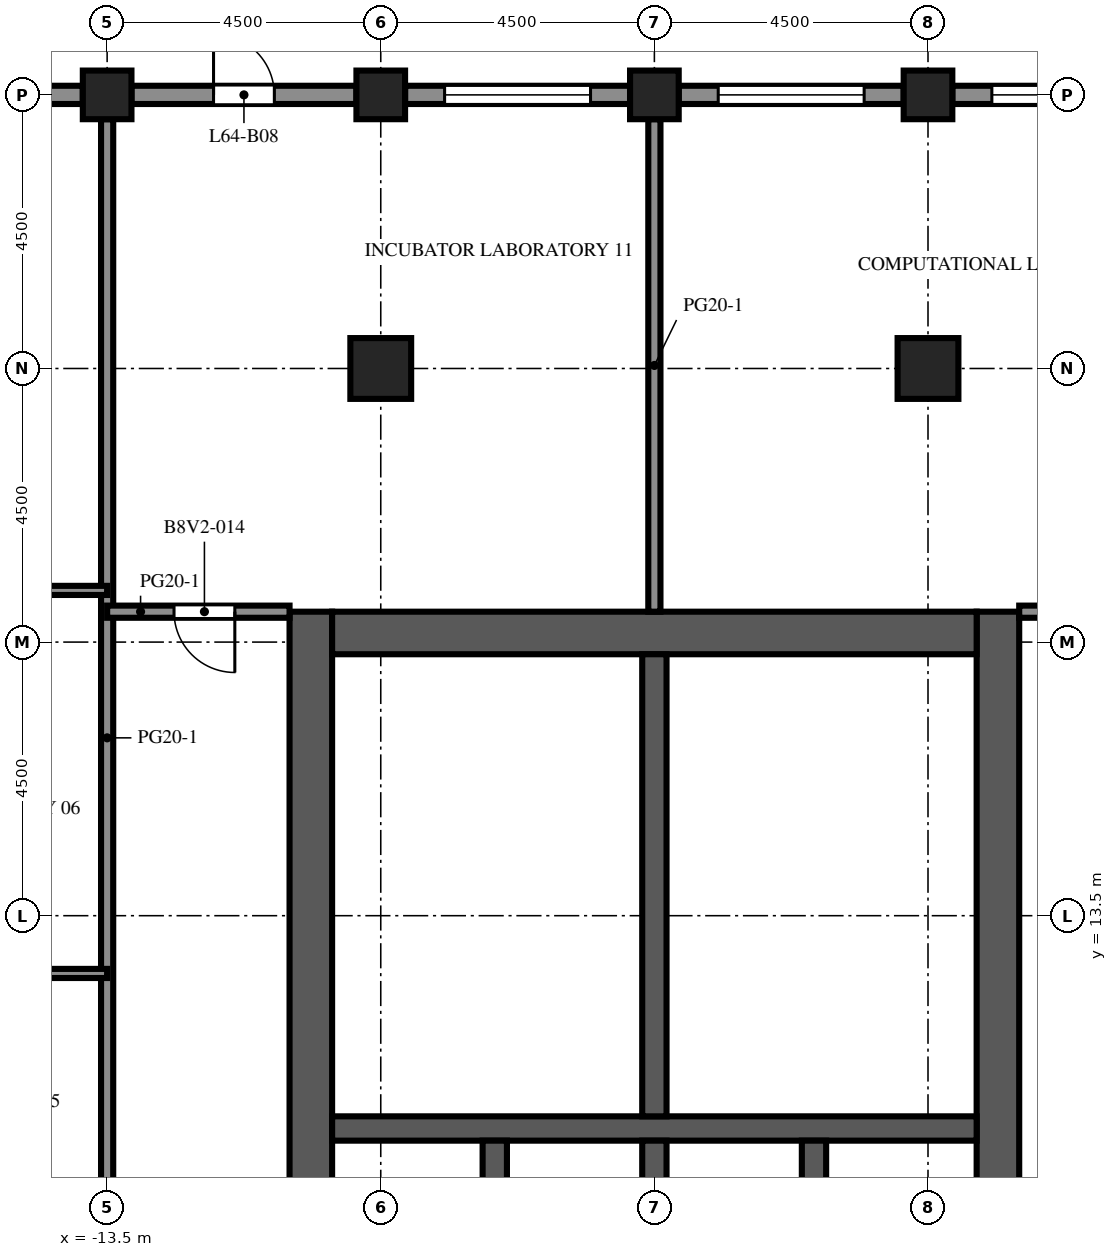
"""IFC4 building model, lengths in metres.
Left out: names, types, materials, properties, quantities, classifications, styles, units other than length and angle.
Written with IfcOpenShell. Run it as: python <this file> out.ifc"""

import sys

from ifc_helpers import new_model, si_unit, direction, frame, frame_2d, origin, origin_2d, place, context, subcontext, project, spatial, rectangle, extrude, element, fill, save


model = new_model("IFC4")
c1 = context("Model", 3, precision=1e-05, world=origin(), true_north=direction((0.0, 1.0)))
c2 = subcontext(c1, "Body", "Model", "MODEL_VIEW")
j1 = project(units=[si_unit("LENGTHUNIT", "METRE"), si_unit("PLANEANGLEUNIT", "RADIAN")], contexts=[c1])
p1 = place(None, origin())
s1 = spatial("IfcSite", under=j1, at=p1, CompositionType="ELEMENT")
p2 = place(p1, origin())
s2 = spatial("IfcBuilding", under=s1, at=p2, CompositionType="ELEMENT")
p3 = place(p2, frame((0.0, 0.0, 282.7)))
s3 = spatial("IfcBuildingStorey", under=s2, at=p3, CompositionType="ELEMENT", Elevation=282.7)
for number, where, z_axis, x_axis in (
    (1, (-13.5, 27.0, 0.0), (0.0, 0.0, 1.0), (1.0, 0.0, 0.0)),
    (2, (-9.0, 27.0, 0.0), (0.0, 0.0, 1.0), (1.0, 0.0, 0.0)),
    (3, (-4.5, 27.0, 0.0), (0.0, 0.0, 1.0), (1.0, 0.0, 0.0)),
    (4, (0.0, 27.0, 0.0), (0.0, 0.0, 1.0), (1.0, 0.0, 0.0)),
):
    element("IfcColumn", number, at=place(p3, frame(where, z_axis=z_axis, x_axis=x_axis)), inside=s3, PredefinedType="COLUMN", context=c2, shape_type="SweptSolid", body=[
        extrude(rectangle(XDim=0.8, YDim=0.8, at=origin_2d()), origin(), (0.0, 0.0, 1.0), 4.1),
    ])
for number, where, z_axis, x_axis in (
    (5, (-9.0, 22.5, 0.0), (0.0, 0.0, 1.0), (1.0, 0.0, 0.0)),
    (6, (0.0, 22.5, 0.0), (0.0, 0.0, 1.0), (1.0, 0.0, 0.0)),
):
    element("IfcColumn", number, at=place(p3, frame(where, z_axis=z_axis, x_axis=x_axis)), inside=s3, PredefinedType="COLUMN", context=c2, shape_type="SweptSolid", body=[
        extrude(rectangle(XDim=1.0, YDim=1.0, at=origin_2d()), origin(), (0.0, 0.0, 1.0), 4.1),
    ])
p4 = place(p3, frame((-10.15, -9.0, 0.0), z_axis=(0.0, 0.0, 1.0), x_axis=(0.0, 1.0, 0.0)))
e7 = element("IfcWall", 7, at=p4, inside=s3, PredefinedType="SHEAR", context=c2, shape_type="SweptSolid", body=[
    extrude(rectangle(XDim=27.5, YDim=0.7, at=frame_2d((13.75, 0.0))), origin(), (0.0, 0.0, 1.0), 4.1),
])
p5 = place(p4, frame((12.55, 0.0, 0.0)))
e8 = element("IfcOpeningElement", 8, at=p5, cuts=e7, PredefinedType="OPENING", context=c2, shape_type="SweptSolid", body=[
    extrude(rectangle(XDim=2.4, YDim=2.4, at=frame_2d((1.2, 1.2))), frame((0.0, 0.36, 0.0), z_axis=(0.0, -1.0, 0.0), x_axis=(1.0, 0.0, 0.0)), (0.0, 0.0, 1.0), 0.72),
])
p6 = place(p4, frame((6.825, 0.0, 0.0)))
e9 = element("IfcOpeningElement", 9, at=p6, cuts=e7, PredefinedType="OPENING", context=c2, shape_type="SweptSolid", body=[
    extrude(rectangle(XDim=1.2, YDim=2.1, at=frame_2d((0.6, 1.05))), frame((0.0, 0.36, 0.0), z_axis=(0.0, -1.0, 0.0), x_axis=(1.0, 0.0, 0.0)), (0.0, 0.0, 1.0), 0.72),
])
p7 = place(p4, frame((19.475, 0.0, 0.0)))
e10 = element("IfcOpeningElement", 10, at=p7, cuts=e7, PredefinedType="OPENING", context=c2, shape_type="SweptSolid", body=[
    extrude(rectangle(XDim=1.2, YDim=2.1, at=frame_2d((0.6, 1.05))), frame((0.0, 0.36, 0.0), z_axis=(0.0, -1.0, 0.0), x_axis=(1.0, 0.0, 0.0)), (0.0, 0.0, 1.0), 0.72),
])
p8 = place(p3, frame((1.15, -9.0, 0.0), z_axis=(0.0, 0.0, 1.0), x_axis=(0.0, 1.0, 0.0)))
e11 = element("IfcWall", 11, at=p8, inside=s3, PredefinedType="SHEAR", context=c2, shape_type="SweptSolid", body=[
    extrude(rectangle(XDim=27.5, YDim=0.7, at=frame_2d((13.75, 0.0))), origin(), (0.0, 0.0, 1.0), 4.1),
])
p9 = place(p8, frame((12.55, 0.0, 0.0)))
e12 = element("IfcOpeningElement", 12, at=p9, cuts=e11, PredefinedType="OPENING", context=c2, shape_type="SweptSolid", body=[
    extrude(rectangle(XDim=2.4, YDim=2.4, at=frame_2d((1.2, 1.2))), frame((0.0, 0.36, 0.0), z_axis=(0.0, -1.0, 0.0), x_axis=(1.0, 0.0, 0.0)), (0.0, 0.0, 1.0), 0.72),
])
p10 = place(p8, frame((3.9, 0.0, 0.0)))
e13 = element("IfcOpeningElement", 13, at=p10, cuts=e11, PredefinedType="OPENING", context=c2, shape_type="SweptSolid", body=[
    extrude(rectangle(XDim=1.2, YDim=2.1, at=frame_2d((0.6, 1.05))), frame((0.0, 0.36, 0.0), z_axis=(0.0, -1.0, 0.0), x_axis=(1.0, 0.0, 0.0)), (0.0, 0.0, 1.0), 0.72),
])
p11 = place(p8, frame((22.4, 0.0, 0.0)))
e14 = element("IfcOpeningElement", 14, at=p11, cuts=e11, PredefinedType="OPENING", context=c2, shape_type="SweptSolid", body=[
    extrude(rectangle(XDim=1.2, YDim=2.1, at=frame_2d((0.6, 1.05))), frame((0.0, 0.36, 0.0), z_axis=(0.0, -1.0, 0.0), x_axis=(1.0, 0.0, 0.0)), (0.0, 0.0, 1.0), 0.72),
])
p12 = place(p3, frame((-9.8, 18.15, 0.0), z_axis=(0.0, 0.0, 1.0), x_axis=(1.0, 0.0, 0.0)))
e15 = element("IfcWall", 15, at=p12, inside=s3, PredefinedType="SHEAR", context=c2, shape_type="SweptSolid", body=[
    extrude(rectangle(XDim=10.6, YDim=0.7, at=frame_2d((5.3, 0.0))), origin(), (0.0, 0.0, 1.0), 4.1),
])
p13 = place(p3, frame((-9.8, 10.0, 0.0), z_axis=(0.0, 0.0, 1.0), x_axis=(1.0, 0.0, 0.0)))
e16 = element("IfcWall", 16, at=p13, inside=s3, PredefinedType="SHEAR", context=c2, shape_type="SweptSolid", body=[
    extrude(rectangle(XDim=10.6, YDim=0.4, at=frame_2d((5.3, 0.0))), origin(), (0.0, 0.0, 1.0), 4.1),
])
for number, where, z_axis, x_axis in (
    (17, (-7.125, 6.9, 0.0), (0.0, 0.0, 1.0), (0.0, 1.0, 0.0)),
    (18, (-4.5, 6.9, 0.0), (0.0, 0.0, 1.0), (0.0, 1.0, 0.0)),
    (19, (-1.875, 6.9, 0.0), (0.0, 0.0, 1.0), (0.0, 1.0, 0.0)),
):
    element("IfcWall", number, at=place(p3, frame(where, z_axis=z_axis, x_axis=x_axis)), inside=s3, PredefinedType="SHEAR", context=c2, shape_type="SweptSolid", body=[
        extrude(rectangle(XDim=2.9, YDim=0.4, at=frame_2d((1.45, 0.0))), origin(), (0.0, 0.0, 1.0), 4.1),
    ])
p14 = place(p3, frame((-4.5, 10.2, 0.0), z_axis=(0.0, 0.0, 1.0), x_axis=(0.0, 1.0, 0.0)))
e20 = element("IfcWall", 20, at=p14, inside=s3, PredefinedType="SHEAR", context=c2, shape_type="SweptSolid", body=[
    extrude(rectangle(XDim=7.6, YDim=0.4, at=frame_2d((3.8, 0.0))), origin(), (0.0, 0.0, 1.0), 4.1),
])
p15 = place(p3, frame((0.4, 27.0, 0.0), z_axis=(0.0, 0.0, 1.0), x_axis=(1.0, 0.0, 0.0)))
e21 = element("IfcWall", 21, at=p15, inside=s3, PredefinedType="SOLIDWALL", context=c2, shape_type="SweptSolid", body=[
    extrude(rectangle(XDim=3.7, YDim=0.3, at=frame_2d((1.85, 0.0))), origin(), (0.0, 0.0, 1.0), 2.85),
])
p16 = place(p15, frame((0.65, 0.0, 0.8)))
e22 = element("IfcOpeningElement", 22, at=p16, cuts=e21, PredefinedType="OPENING", context=c2, shape_type="SweptSolid", body=[
    extrude(rectangle(XDim=2.4, YDim=1.7, at=frame_2d((1.2, 0.85))), frame((0.0, 0.16, 0.0), z_axis=(0.0, -1.0, 0.0), x_axis=(1.0, 0.0, 0.0)), (0.0, 0.0, 1.0), 0.32),
])
p17 = place(p3, frame((-4.1, 27.0, 0.0), z_axis=(0.0, 0.0, 1.0), x_axis=(1.0, 0.0, 0.0)))
e23 = element("IfcWall", 23, at=p17, inside=s3, PredefinedType="SOLIDWALL", context=c2, shape_type="SweptSolid", body=[
    extrude(rectangle(XDim=3.7, YDim=0.3, at=frame_2d((1.85, 0.0))), origin(), (0.0, 0.0, 1.0), 2.85),
])
p18 = place(p17, frame((0.65, 0.0, 0.8)))
e24 = element("IfcOpeningElement", 24, at=p18, cuts=e23, PredefinedType="OPENING", context=c2, shape_type="SweptSolid", body=[
    extrude(rectangle(XDim=2.4, YDim=1.7, at=frame_2d((1.2, 0.85))), frame((0.0, 0.16, 0.0), z_axis=(0.0, -1.0, 0.0), x_axis=(1.0, 0.0, 0.0)), (0.0, 0.0, 1.0), 0.32),
])
p19 = place(p3, frame((-8.6, 27.0, 0.0), z_axis=(0.0, 0.0, 1.0), x_axis=(1.0, 0.0, 0.0)))
e25 = element("IfcWall", 25, at=p19, inside=s3, PredefinedType="SOLIDWALL", context=c2, shape_type="SweptSolid", body=[
    extrude(rectangle(XDim=3.7, YDim=0.3, at=frame_2d((1.85, 0.0))), origin(), (0.0, 0.0, 1.0), 2.85),
])
p20 = place(p19, frame((0.65, 0.0, 0.8)))
e26 = element("IfcOpeningElement", 26, at=p20, cuts=e25, PredefinedType="OPENING", context=c2, shape_type="SweptSolid", body=[
    extrude(rectangle(XDim=2.4, YDim=1.7, at=frame_2d((1.2, 0.85))), frame((0.0, 0.16, 0.0), z_axis=(0.0, -1.0, 0.0), x_axis=(1.0, 0.0, 0.0)), (0.0, 0.0, 1.0), 0.32),
])
p21 = place(p3, frame((-13.1, 27.0, 0.0), z_axis=(0.0, 0.0, 1.0), x_axis=(1.0, 0.0, 0.0)))
e27 = element("IfcWall", 27, at=p21, inside=s3, PredefinedType="SOLIDWALL", context=c2, shape_type="SweptSolid", body=[
    extrude(rectangle(XDim=3.7, YDim=0.3, at=frame_2d((1.85, 0.0))), origin(), (0.0, 0.0, 1.0), 2.85),
])
p22 = place(p21, frame((1.35, 0.0, 0.0)))
e28 = element("IfcOpeningElement", 28, at=p22, cuts=e27, PredefinedType="OPENING", context=c2, shape_type="SweptSolid", body=[
    extrude(rectangle(XDim=1.0, YDim=2.2, at=frame_2d((0.5, 1.1))), frame((0.0, 0.16, 0.0), z_axis=(0.0, -1.0, 0.0), x_axis=(1.0, 0.0, 0.0)), (0.0, 0.0, 1.0), 0.32),
])
p23 = place(p3, frame((-17.6, 27.0, 0.0), z_axis=(0.0, 0.0, 1.0), x_axis=(1.0, 0.0, 0.0)))
e29 = element("IfcWall", 29, at=p23, inside=s3, PredefinedType="SOLIDWALL", context=c2, shape_type="SweptSolid", body=[
    extrude(rectangle(XDim=3.7, YDim=0.3, at=frame_2d((1.85, 0.0))), origin(), (0.0, 0.0, 1.0), 2.85),
])
p24 = place(p23, frame((0.65, 0.0, 0.8)))
e30 = element("IfcOpeningElement", 30, at=p24, cuts=e29, PredefinedType="OPENING", context=c2, shape_type="SweptSolid", body=[
    extrude(rectangle(XDim=2.4, YDim=1.7, at=frame_2d((1.2, 0.85))), frame((0.0, 0.16, 0.0), z_axis=(0.0, -1.0, 0.0), x_axis=(1.0, 0.0, 0.0)), (0.0, 0.0, 1.0), 0.32),
])
p25 = place(p3, frame((-0.6, 10.2, 0.0), z_axis=(0.0, 0.0, 1.0), x_axis=(0.0, 1.0, 0.0)))
e31 = element("IfcWall", 31, at=p25, inside=s3, PredefinedType="PARTITIONING", context=c2, shape_type="SweptSolid", body=[
    extrude(rectangle(XDim=2.28, YDim=0.1, at=frame_2d((1.14, 0.0))), origin(), (0.0, 0.0, 1.0), 3.65),
])
p26 = place(p25, frame((0.64, 0.0, 0.0)))
e32 = element("IfcOpeningElement", 32, at=p26, cuts=e31, PredefinedType="OPENING", context=c2, shape_type="SweptSolid", body=[
    extrude(rectangle(XDim=1.0, YDim=2.1, at=frame_2d((0.5, 1.05))), frame((0.0, 0.06, 0.0), z_axis=(0.0, -1.0, 0.0), x_axis=(1.0, 0.0, 0.0)), (0.0, 0.0, 1.0), 0.12),
])
p27 = place(p3, frame((-0.6, 12.48, 0.0), z_axis=(0.0, 0.0, 1.0), x_axis=(0.0, 1.0, 0.0)))
e33 = element("IfcWall", 33, at=p27, inside=s3, PredefinedType="PARTITIONING", context=c2, shape_type="SweptSolid", body=[
    extrude(rectangle(XDim=2.432, YDim=0.1, at=frame_2d((1.216, 0.0))), origin(), (0.0, 0.0, 1.0), 3.65),
])
p28 = place(p27, frame((0.716, 0.0, 0.0)))
e34 = element("IfcOpeningElement", 34, at=p28, cuts=e33, PredefinedType="OPENING", context=c2, shape_type="SweptSolid", body=[
    extrude(rectangle(XDim=1.0, YDim=2.1, at=frame_2d((0.5, 1.05))), frame((0.0, 0.06, 0.0), z_axis=(0.0, -1.0, 0.0), x_axis=(1.0, 0.0, 0.0)), (0.0, 0.0, 1.0), 0.12),
])
p29 = place(p3, frame((-0.6, 14.912, 0.0), z_axis=(0.0, 0.0, 1.0), x_axis=(0.0, 1.0, 0.0)))
e35 = element("IfcWall", 35, at=p29, inside=s3, PredefinedType="PARTITIONING", context=c2, shape_type="SweptSolid", body=[
    extrude(rectangle(XDim=2.888, YDim=0.1, at=frame_2d((1.444, 0.0))), origin(), (0.0, 0.0, 1.0), 3.65),
])
p30 = place(p29, frame((0.944, 0.0, 0.0)))
e36 = element("IfcOpeningElement", 36, at=p30, cuts=e35, PredefinedType="OPENING", context=c2, shape_type="SweptSolid", body=[
    extrude(rectangle(XDim=1.0, YDim=2.1, at=frame_2d((0.5, 1.05))), frame((0.0, 0.06, 0.0), z_axis=(0.0, -1.0, 0.0), x_axis=(1.0, 0.0, 0.0)), (0.0, 0.0, 1.0), 0.12),
])
for number, where, z_axis, x_axis in (
    (37, (-4.3, 12.48, 0.0), (0.0, 0.0, 1.0), (1.0, 0.0, 0.0)),
    (38, (-4.3, 14.912, 0.0), (0.0, 0.0, 1.0), (1.0, 0.0, 0.0)),
):
    element("IfcWall", number, at=place(p3, frame(where, z_axis=z_axis, x_axis=x_axis)), inside=s3, PredefinedType="PARTITIONING", context=c2, shape_type="SweptSolid", body=[
        extrude(rectangle(XDim=3.7, YDim=0.1, at=frame_2d((1.85, 0.0))), origin(), (0.0, 0.0, 1.0), 3.65),
    ])
p31 = place(p3, frame((-13.5, 6.25, 0.0), z_axis=(0.0, 0.0, 1.0), x_axis=(0.0, 1.0, 0.0)))
e39 = element("IfcWall", 39, at=p31, inside=s3, PredefinedType="PARTITIONING", context=c2, shape_type="SweptSolid", body=[
    extrude(rectangle(XDim=20.35, YDim=0.2, at=frame_2d((10.175, 0.0))), origin(), (0.0, 0.0, 1.0), 3.65),
])
p32 = place(p3, frame((-4.5, 18.5, 0.0), z_axis=(0.0, 0.0, 1.0), x_axis=(0.0, 1.0, 0.0)))
e40 = element("IfcWall", 40, at=p32, inside=s3, PredefinedType="PARTITIONING", context=c2, shape_type="SweptSolid", body=[
    extrude(rectangle(XDim=8.1, YDim=0.2, at=frame_2d((4.05, 0.0))), origin(), (0.0, 0.0, 1.0), 3.65),
])
p33 = place(p3, frame((-22.35, 12.55, 0.0), z_axis=(0.0, 0.0, 1.0), x_axis=(1.0, 0.0, 0.0)))
e41 = element("IfcWall", 41, at=p33, inside=s3, PredefinedType="PARTITIONING", context=c2, shape_type="SweptSolid", body=[
    extrude(rectangle(XDim=8.85, YDim=0.15, at=frame_2d((4.425, 0.0))), origin(), (0.0, 0.0, 1.0), 3.65),
])
p34 = place(p33, frame((4.2, 0.0, 0.0)))
e42 = element("IfcOpeningElement", 42, at=p34, cuts=e41, PredefinedType="OPENING", context=c2, shape_type="SweptSolid", body=[
    extrude(rectangle(XDim=1.0, YDim=2.1, at=frame_2d((0.5, 1.05))), frame((0.0, 0.085, 0.0), z_axis=(0.0, -1.0, 0.0), x_axis=(1.0, 0.0, 0.0)), (0.0, 0.0, 1.0), 0.17),
])
p35 = place(p3, frame((-13.5, 18.5, 0.0), z_axis=(0.0, 0.0, 1.0), x_axis=(1.0, 0.0, 0.0)))
e43 = element("IfcWall", 43, at=p35, inside=s3, PredefinedType="PARTITIONING", context=c2, shape_type="SweptSolid", body=[
    extrude(rectangle(XDim=3.0, YDim=0.2, at=frame_2d((1.5, 0.0))), origin(), (0.0, 0.0, 1.0), 3.65),
])
p36 = place(p35, frame((1.1, 0.0, 0.0)))
e44 = element("IfcOpeningElement", 44, at=p36, cuts=e43, PredefinedType="OPENING", context=c2, shape_type="SweptSolid", body=[
    extrude(rectangle(XDim=1.0, YDim=2.1, at=frame_2d((0.5, 1.05))), frame((0.0, 0.11, 0.0), z_axis=(0.0, -1.0, 0.0), x_axis=(1.0, 0.0, 0.0)), (0.0, 0.0, 1.0), 0.22),
])
p37 = place(p3, frame((1.5, 18.5, 0.0), z_axis=(0.0, 0.0, 1.0), x_axis=(1.0, 0.0, 0.0)))
e45 = element("IfcWall", 45, at=p37, inside=s3, PredefinedType="PARTITIONING", context=c2, shape_type="SweptSolid", body=[
    extrude(rectangle(XDim=4.5, YDim=0.2, at=frame_2d((2.25, 0.0))), origin(), (0.0, 0.0, 1.0), 3.65),
])
p38 = place(p37, frame((1.35, 0.0, 0.0)))
e46 = element("IfcOpeningElement", 46, at=p38, cuts=e45, PredefinedType="OPENING", context=c2, shape_type="SweptSolid", body=[
    extrude(rectangle(XDim=1.0, YDim=2.1, at=frame_2d((0.5, 1.05))), frame((0.0, 0.11, 0.0), z_axis=(0.0, -1.0, 0.0), x_axis=(1.0, 0.0, 0.0)), (0.0, 0.0, 1.0), 0.22),
])
p39 = place(p3, frame((-22.35, 18.85, 0.0), z_axis=(0.0, 0.0, 1.0), x_axis=(1.0, 0.0, 0.0)))
e47 = element("IfcWall", 47, at=p39, inside=s3, PredefinedType="PARTITIONING", context=c2, shape_type="SweptSolid", body=[
    extrude(rectangle(XDim=8.85, YDim=0.15, at=frame_2d((4.425, 0.0))), origin(), (0.0, 0.0, 1.0), 3.65),
])
p40 = place(p39, frame((2.7, 0.0, 0.0)))
e48 = element("IfcOpeningElement", 48, at=p40, cuts=e47, PredefinedType="OPENING", context=c2, shape_type="SweptSolid", body=[
    extrude(rectangle(XDim=1.0, YDim=2.1, at=frame_2d((0.5, 1.05))), frame((0.0, 0.085, 0.0), z_axis=(0.0, -1.0, 0.0), x_axis=(1.0, 0.0, 0.0)), (0.0, 0.0, 1.0), 0.17),
])
p41 = place(p16, origin())
e49 = element("IfcWindow", 49, at=p41, inside=s3, PartitioningType="SINGLE_PANEL", PredefinedType="WINDOW", context=c2, shape_type="SweptSolid", body=[
    extrude(rectangle(XDim=2.4, YDim=1.7, at=frame_2d((1.2, 0.85))), frame((0.0, 0.03, 0.0), z_axis=(0.0, -1.0, 0.0), x_axis=(1.0, 0.0, 0.0)), (0.0, 0.0, 1.0), 0.06),
])
fill(e22, e49)
p42 = place(p18, origin())
e50 = element("IfcWindow", 50, at=p42, inside=s3, PartitioningType="SINGLE_PANEL", PredefinedType="WINDOW", context=c2, shape_type="SweptSolid", body=[
    extrude(rectangle(XDim=2.4, YDim=1.7, at=frame_2d((1.2, 0.85))), frame((0.0, 0.03, 0.0), z_axis=(0.0, -1.0, 0.0), x_axis=(1.0, 0.0, 0.0)), (0.0, 0.0, 1.0), 0.06),
])
fill(e24, e50)
p43 = place(p20, origin())
e51 = element("IfcWindow", 51, at=p43, inside=s3, PartitioningType="SINGLE_PANEL", PredefinedType="WINDOW", context=c2, shape_type="SweptSolid", body=[
    extrude(rectangle(XDim=2.4, YDim=1.7, at=frame_2d((1.2, 0.85))), frame((0.0, 0.03, 0.0), z_axis=(0.0, -1.0, 0.0), x_axis=(1.0, 0.0, 0.0)), (0.0, 0.0, 1.0), 0.06),
])
fill(e26, e51)
p44 = place(p22, origin())
e52 = element("IfcDoor", 52, at=p44, inside=s3, OperationType="SINGLE_SWING_LEFT", PredefinedType="DOOR", context=c2, shape_type="SweptSolid", body=[
    extrude(rectangle(XDim=1.0, YDim=2.2, at=frame_2d((0.5, 1.1))), frame((0.0, 0.025, 0.0), z_axis=(0.0, -1.0, 0.0), x_axis=(1.0, 0.0, 0.0)), (0.0, 0.0, 1.0), 0.05),
])
fill(e28, e52)
p45 = place(p7, origin())
e53 = element("IfcDoor", 53, at=p45, inside=s3, OperationType="SINGLE_SWING_LEFT", PredefinedType="DOOR", context=c2, shape_type="SweptSolid", body=[
    extrude(rectangle(XDim=1.2, YDim=2.1, at=frame_2d((0.6, 1.05))), frame((0.0, 0.025, 0.0), z_axis=(0.0, -1.0, 0.0), x_axis=(1.0, 0.0, 0.0)), (0.0, 0.0, 1.0), 0.05),
])
fill(e10, e53)
p46 = place(p11, origin())
e54 = element("IfcDoor", 54, at=p46, inside=s3, OperationType="SINGLE_SWING_LEFT", PredefinedType="DOOR", context=c2, shape_type="SweptSolid", body=[
    extrude(rectangle(XDim=1.2, YDim=2.1, at=frame_2d((0.6, 1.05))), frame((0.0, 0.325, 0.0), z_axis=(0.0, -1.0, 0.0), x_axis=(1.0, 0.0, 0.0)), (0.0, 0.0, 1.0), 0.05),
])
fill(e14, e54)
p47 = place(p26, origin())
e55 = element("IfcDoor", 55, at=p47, inside=s3, OperationType="SINGLE_SWING_RIGHT", PredefinedType="DOOR", context=c2, shape_type="SweptSolid", body=[
    extrude(rectangle(XDim=1.0, YDim=2.1, at=frame_2d((0.5, 1.05))), frame((0.0, 0.025, 0.0), z_axis=(0.0, -1.0, 0.0), x_axis=(1.0, 0.0, 0.0)), (0.0, 0.0, 1.0), 0.05),
])
fill(e32, e55)
p48 = place(p28, origin())
e56 = element("IfcDoor", 56, at=p48, inside=s3, OperationType="SINGLE_SWING_LEFT", PredefinedType="DOOR", context=c2, shape_type="SweptSolid", body=[
    extrude(rectangle(XDim=1.0, YDim=2.1, at=frame_2d((0.5, 1.05))), frame((0.0, 0.025, 0.0), z_axis=(0.0, -1.0, 0.0), x_axis=(1.0, 0.0, 0.0)), (0.0, 0.0, 1.0), 0.05),
])
fill(e34, e56)
p49 = place(p30, origin())
e57 = element("IfcDoor", 57, at=p49, inside=s3, OperationType="SINGLE_SWING_RIGHT", PredefinedType="DOOR", context=c2, shape_type="SweptSolid", body=[
    extrude(rectangle(XDim=1.0, YDim=2.1, at=frame_2d((0.5, 1.05))), frame((0.0, 0.025, 0.0), z_axis=(0.0, -1.0, 0.0), x_axis=(1.0, 0.0, 0.0)), (0.0, 0.0, 1.0), 0.05),
])
fill(e36, e57)
p50 = place(p36, origin())
e58 = element("IfcDoor", 58, at=p50, inside=s3, OperationType="SINGLE_SWING_RIGHT", PredefinedType="DOOR", context=c2, shape_type="SweptSolid", body=[
    extrude(rectangle(XDim=1.0, YDim=2.1, at=frame_2d((0.5, 1.05))), frame((0.0, 0.025, 0.0), z_axis=(0.0, -1.0, 0.0), x_axis=(1.0, 0.0, 0.0)), (0.0, 0.0, 1.0), 0.05),
])
fill(e44, e58)
save(model, sys.argv[1])
